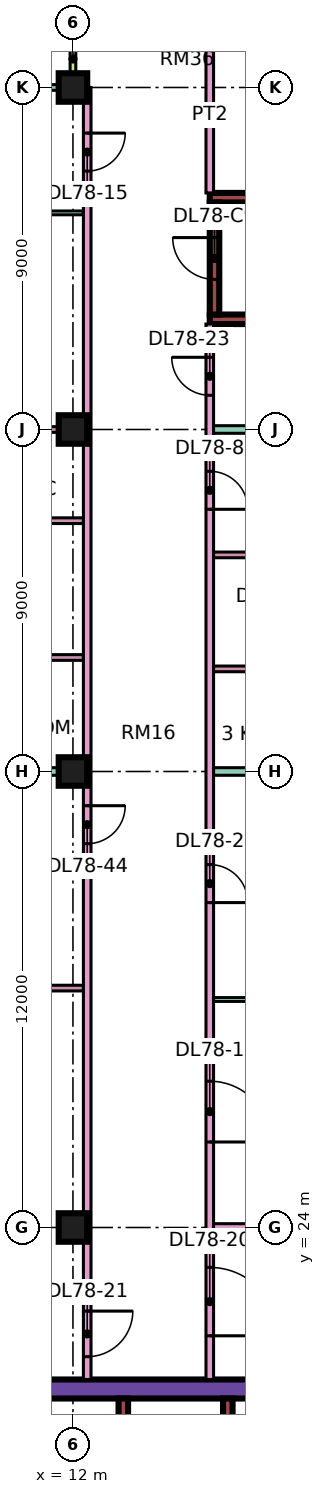
"""IFC4 building model, lengths in metres.
Left out: names, types, materials, properties, quantities, classifications, styles, units other than length and angle.
Written with IfcOpenShell. Run it as: python <this file> out.ifc"""

import sys

from ifc_helpers import new_model, si_unit, direction, frame, frame_2d, origin, origin_2d, place, context, subcontext, project, spatial, rectangle, extrude, element, fill, save


model = new_model("IFC4")
c1 = context("Model", 3, precision=1e-05, world=origin(), true_north=direction((0.0, 1.0)))
c2 = subcontext(c1, "Body", "Model", "MODEL_VIEW")
j1 = project(units=[si_unit("LENGTHUNIT", "METRE"), si_unit("PLANEANGLEUNIT", "RADIAN")], contexts=[c1])
p1 = place(None, origin())
s1 = spatial("IfcSite", under=j1, at=p1, CompositionType="ELEMENT")
p2 = place(p1, origin())
s2 = spatial("IfcBuilding", under=s1, at=p2, CompositionType="ELEMENT")
p3 = place(p2, frame((0.0, 0.0, 338.9)))
s3 = spatial("IfcBuildingStorey", under=s2, at=p3, CompositionType="ELEMENT", Elevation=338.9)
for number, where, z_axis, x_axis in (
    (1, (12.0, 24.0, 0.0), (0.0, 0.0, 1.0), (1.0, 0.0, 0.0)),
    (2, (12.0, 36.0, 0.0), (0.0, 0.0, 1.0), (1.0, 0.0, 0.0)),
    (3, (12.0, 45.0, 0.0), (0.0, 0.0, 1.0), (1.0, 0.0, 0.0)),
    (4, (12.0, 54.0, 0.0), (0.0, 0.0, 1.0), (1.0, 0.0, 0.0)),
):
    element("IfcColumn", number, at=place(p3, frame(where, z_axis=z_axis, x_axis=x_axis)), inside=s3, PredefinedType="COLUMN", context=c2, shape_type="SweptSolid", body=[
        extrude(rectangle(XDim=0.75, YDim=0.75, at=origin_2d()), origin(), (0.0, 0.0, 1.0), 3.75),
    ])
p4 = place(p3, frame((9.0, 19.75, 0.0), z_axis=(0.0, 0.0, 1.0), x_axis=(1.0, 0.0, 0.0)))
e5 = element("IfcWall", 5, at=p4, inside=s3, PredefinedType="SHEAR", context=c2, shape_type="SweptSolid", body=[
    extrude(rectangle(XDim=25.0, YDim=0.5, at=frame_2d((12.5, 0.0))), origin(), (0.0, 0.0, 1.0), 3.75),
])
p5 = place(p4, frame((19.1, 0.0, 0.0)))
e6 = element("IfcOpeningElement", 6, at=p5, cuts=e5, PredefinedType="OPENING", context=c2, shape_type="SweptSolid", body=[
    extrude(rectangle(XDim=1.8, YDim=2.4, at=frame_2d((0.9, 1.2))), frame((0.0, 0.26, 0.0), z_axis=(0.0, -1.0, 0.0), x_axis=(1.0, 0.0, 0.0)), (0.0, 0.0, 1.0), 0.52),
])
p6 = place(p3, frame((13.325, 7.5, 0.0), z_axis=(0.0, 0.0, 1.0), x_axis=(0.0, 1.0, 0.0)))
e7 = element("IfcWall", 7, at=p6, inside=s3, PredefinedType="SHEAR", context=c2, shape_type="SweptSolid", body=[
    extrude(rectangle(XDim=12.0, YDim=0.25, at=frame_2d((6.0, 0.0))), origin(), (0.0, 0.0, 1.0), 3.75),
])
p7 = place(p3, frame((16.075, 15.8, 0.0), z_axis=(0.0, 0.0, 1.0), x_axis=(0.0, 1.0, 0.0)))
e8 = element("IfcWall", 8, at=p7, inside=s3, PredefinedType="SHEAR", context=c2, shape_type="SweptSolid", body=[
    extrude(rectangle(XDim=3.7, YDim=0.25, at=frame_2d((1.85, 0.0))), origin(), (0.0, 0.0, 1.0), 3.75),
])
for number, where, z_axis, x_axis in (
    (9, (15.6, 47.9, 0.0), (0.0, 0.0, 1.0), (1.0, 0.0, 0.0)),
    (10, (15.6, 51.1, 0.0), (0.0, 0.0, 1.0), (1.0, 0.0, 0.0)),
):
    element("IfcWall", number, at=place(p3, frame(where, z_axis=z_axis, x_axis=x_axis)), inside=s3, PredefinedType="SHEAR", context=c2, shape_type="SweptSolid", body=[
        extrude(rectangle(XDim=7.0, YDim=0.25, at=frame_2d((3.5, 0.0))), origin(), (0.0, 0.0, 1.0), 3.75),
    ])
p8 = place(p3, frame((15.725, 48.025, 0.0), z_axis=(0.0, 0.0, 1.0), x_axis=(0.0, 1.0, 0.0)))
e11 = element("IfcWall", 11, at=p8, inside=s3, PredefinedType="SHEAR", context=c2, shape_type="SweptSolid", body=[
    extrude(rectangle(XDim=2.95, YDim=0.25, at=frame_2d((1.475, 0.0))), origin(), (0.0, 0.0, 1.0), 3.75),
])
p9 = place(p8, frame((0.925, 0.0, 0.0)))
e12 = element("IfcOpeningElement", 12, at=p9, cuts=e11, PredefinedType="OPENING", context=c2, shape_type="SweptSolid", body=[
    extrude(rectangle(XDim=1.1, YDim=2.2, at=frame_2d((0.55, 1.1))), frame((0.0, 0.135, 0.0), z_axis=(0.0, -1.0, 0.0), x_axis=(1.0, 0.0, 0.0)), (0.0, 0.0, 1.0), 0.27),
])
p10 = place(p3, frame((11.925, 54.0, 0.0), z_axis=(0.0, 0.0, 1.0), x_axis=(-1.0, 0.0, 0.0)))
e13 = element("IfcWall", 13, at=p10, inside=s3, PredefinedType="SOLIDWALL", context=c2, shape_type="SweptSolid", body=[
    extrude(rectangle(XDim=10.35, YDim=0.15, at=frame_2d((5.175, 0.0))), origin(), (0.0, 0.0, 1.0), 3.35),
])
p11 = place(p10, frame((2.075, 0.0, 0.0)))
e14 = element("IfcOpeningElement", 14, at=p11, cuts=e13, PredefinedType="OPENING", context=c2, shape_type="SweptSolid", body=[
    extrude(rectangle(XDim=1.8, YDim=2.4, at=frame_2d((0.9, 1.2))), frame((0.0, 0.085, 0.0), z_axis=(0.0, -1.0, 0.0), x_axis=(1.0, 0.0, 0.0)), (0.0, 0.0, 1.0), 0.17),
])
p12 = place(p10, frame((6.45, 0.0, 0.45)))
e15 = element("IfcOpeningElement", 15, at=p12, cuts=e13, PredefinedType="OPENING", context=c2, shape_type="SweptSolid", body=[
    extrude(rectangle(XDim=3.0, YDim=2.4, at=frame_2d((1.5, 1.2))), frame((0.0, 0.085, 0.0), z_axis=(0.0, -1.0, 0.0), x_axis=(1.0, 0.0, 0.0)), (0.0, 0.0, 1.0), 0.17),
])
p13 = place(p3, frame((12.0, 55.5, 0.0), z_axis=(0.0, 0.0, 1.0), x_axis=(0.0, -1.0, 0.0)))
e16 = element("IfcWall", 16, at=p13, inside=s3, PredefinedType="SOLIDWALL", context=c2, shape_type="SweptSolid", body=[
    extrude(rectangle(XDim=1.5, YDim=0.15, at=frame_2d((0.75, 0.0))), origin(), (0.0, 0.0, 1.0), 3.35),
])
p14 = place(p3, frame((-1.35, 22.4, 0.0), z_axis=(0.0, 0.0, 1.0), x_axis=(1.0, 0.0, 0.0)))
e17 = element("IfcWall", 17, at=p14, inside=s3, PredefinedType="PARTITIONING", context=c2, shape_type="SweptSolid", body=[
    extrude(rectangle(XDim=13.625, YDim=0.2, at=frame_2d((6.812, 0.0))), origin(), (0.0, 0.0, 1.0), 3.35),
])
p15 = place(p3, frame((0.0, 36.0, 0.0), z_axis=(0.0, 0.0, 1.0), x_axis=(1.0, 0.0, 0.0)))
e18 = element("IfcWall", 18, at=p15, inside=s3, PredefinedType="PARTITIONING", context=c2, shape_type="SweptSolid", body=[
    extrude(rectangle(XDim=12.275, YDim=0.2, at=frame_2d((6.137, 0.0))), origin(), (0.0, 0.0, 1.0), 3.35),
])
for number, where, z_axis, x_axis in (
    (19, (7.65, 30.3, 0.0), (0.0, 0.0, 1.0), (1.0, 0.0, 0.0)),
    (20, (7.65, 33.3, 0.0), (0.0, 0.0, 1.0), (1.0, 0.0, 0.0)),
    (21, (7.65, 39.0, 0.0), (0.0, 0.0, 1.0), (1.0, 0.0, 0.0)),
    (22, (7.65, 42.6, 0.0), (0.0, 0.0, 1.0), (1.0, 0.0, 0.0)),
    (23, (7.65, 45.0, 0.0), (0.0, 0.0, 1.0), (1.0, 0.0, 0.0)),
):
    element("IfcWall", number, at=place(p3, frame(where, z_axis=z_axis, x_axis=x_axis)), inside=s3, PredefinedType="PARTITIONING", context=c2, shape_type="SweptSolid", body=[
        extrude(rectangle(XDim=4.625, YDim=0.15, at=frame_2d((2.312, 0.0))), origin(), (0.0, 0.0, 1.0), 3.35),
    ])
p16 = place(p3, frame((7.65, 50.7, 0.0), z_axis=(0.0, 0.0, 1.0), x_axis=(1.0, 0.0, 0.0)))
e24 = element("IfcWall", 24, at=p16, inside=s3, PredefinedType="PARTITIONING", context=c2, shape_type="SweptSolid", body=[
    extrude(rectangle(XDim=4.625, YDim=0.1, at=frame_2d((2.312, 0.0))), origin(), (0.0, 0.0, 1.0), 3.35),
])
p17 = place(p16, frame((1.875, 0.0, 0.0)))
e25 = element("IfcOpeningElement", 25, at=p17, cuts=e24, PredefinedType="OPENING", context=c2, shape_type="SweptSolid", body=[
    extrude(rectangle(XDim=0.9, YDim=2.1, at=frame_2d((0.45, 1.05))), frame((0.0, 0.06, 0.0), z_axis=(0.0, -1.0, 0.0), x_axis=(1.0, 0.0, 0.0)), (0.0, 0.0, 1.0), 0.12),
])
p18 = place(p3, frame((12.375, 20.0, 0.0), z_axis=(0.0, 0.0, 1.0), x_axis=(0.0, 1.0, 0.0)))
e26 = element("IfcWall", 26, at=p18, inside=s3, PredefinedType="PARTITIONING", context=c2, shape_type="SweptSolid", body=[
    extrude(rectangle(XDim=34.0, YDim=0.2, at=frame_2d((17.0, 0.0))), origin(), (0.0, 0.0, 1.0), 3.35),
])
p19 = place(p18, frame((31.8, 0.0, 0.0)))
e27 = element("IfcOpeningElement", 27, at=p19, cuts=e26, PredefinedType="OPENING", context=c2, shape_type="SweptSolid", body=[
    extrude(rectangle(XDim=1.0, YDim=2.1, at=frame_2d((0.5, 1.05))), frame((0.0, 0.11, 0.0), z_axis=(0.0, -1.0, 0.0), x_axis=(1.0, 0.0, 0.0)), (0.0, 0.0, 1.0), 0.22),
])
p20 = place(p18, frame((0.6, 0.0, 0.0)))
e28 = element("IfcOpeningElement", 28, at=p20, cuts=e26, PredefinedType="OPENING", context=c2, shape_type="SweptSolid", body=[
    extrude(rectangle(XDim=1.2, YDim=2.1, at=frame_2d((0.6, 1.05))), frame((0.0, 0.11, 0.0), z_axis=(0.0, -1.0, 0.0), x_axis=(1.0, 0.0, 0.0)), (0.0, 0.0, 1.0), 0.22),
])
p21 = place(p18, frame((14.1, 0.0, 0.0)))
e29 = element("IfcOpeningElement", 29, at=p21, cuts=e26, PredefinedType="OPENING", context=c2, shape_type="SweptSolid", body=[
    extrude(rectangle(XDim=1.0, YDim=2.1, at=frame_2d((0.5, 1.05))), frame((0.0, 0.11, 0.0), z_axis=(0.0, -1.0, 0.0), x_axis=(1.0, 0.0, 0.0)), (0.0, 0.0, 1.0), 0.22),
])
p22 = place(p3, frame((15.6, 20.0, 0.0), z_axis=(0.0, 0.0, 1.0), x_axis=(0.0, 1.0, 0.0)))
e30 = element("IfcWall", 30, at=p22, inside=s3, PredefinedType="PARTITIONING", context=c2, shape_type="SweptSolid", body=[
    extrude(rectangle(XDim=27.775, YDim=0.2, at=frame_2d((13.887, 0.0))), origin(), (0.0, 0.0, 1.0), 3.35),
])
p23 = place(p22, frame((6.25, 0.0, 0.0)))
e31 = element("IfcOpeningElement", 31, at=p23, cuts=e30, PredefinedType="OPENING", context=c2, shape_type="SweptSolid", body=[
    extrude(rectangle(XDim=1.6, YDim=2.1, at=frame_2d((0.8, 1.05))), frame((0.0, 0.11, 0.0), z_axis=(0.0, -1.0, 0.0), x_axis=(1.0, 0.0, 0.0)), (0.0, 0.0, 1.0), 0.22),
])
p24 = place(p22, frame((12.55, 0.0, 0.0)))
e32 = element("IfcOpeningElement", 32, at=p24, cuts=e30, PredefinedType="OPENING", context=c2, shape_type="SweptSolid", body=[
    extrude(rectangle(XDim=1.0, YDim=2.1, at=frame_2d((0.5, 1.05))), frame((0.0, 0.11, 0.0), z_axis=(0.0, -1.0, 0.0), x_axis=(1.0, 0.0, 0.0)), (0.0, 0.0, 1.0), 0.22),
])
p25 = place(p22, frame((22.9, 0.0, 0.0)))
e33 = element("IfcOpeningElement", 33, at=p25, cuts=e30, PredefinedType="OPENING", context=c2, shape_type="SweptSolid", body=[
    extrude(rectangle(XDim=1.0, YDim=2.1, at=frame_2d((0.5, 1.05))), frame((0.0, 0.11, 0.0), z_axis=(0.0, -1.0, 0.0), x_axis=(1.0, 0.0, 0.0)), (0.0, 0.0, 1.0), 0.22),
])
p26 = place(p22, frame((1.15, 0.0, 0.0)))
e34 = element("IfcOpeningElement", 34, at=p26, cuts=e30, PredefinedType="OPENING", context=c2, shape_type="SweptSolid", body=[
    extrude(rectangle(XDim=1.8, YDim=2.1, at=frame_2d((0.9, 1.05))), frame((0.0, 0.11, 0.0), z_axis=(0.0, -1.0, 0.0), x_axis=(1.0, 0.0, 0.0)), (0.0, 0.0, 1.0), 0.22),
])
p27 = place(p22, frame((25.9, 0.0, 0.0)))
e35 = element("IfcOpeningElement", 35, at=p27, cuts=e30, PredefinedType="OPENING", context=c2, shape_type="SweptSolid", body=[
    extrude(rectangle(XDim=1.0, YDim=2.1, at=frame_2d((0.5, 1.05))), frame((0.0, 0.11, 0.0), z_axis=(0.0, -1.0, 0.0), x_axis=(1.0, 0.0, 0.0)), (0.0, 0.0, 1.0), 0.22),
])
p28 = place(p3, frame((15.6, 51.225, 0.0), z_axis=(0.0, 0.0, 1.0), x_axis=(0.0, 1.0, 0.0)))
e36 = element("IfcWall", 36, at=p28, inside=s3, PredefinedType="PARTITIONING", context=c2, shape_type="SweptSolid", body=[
    extrude(rectangle(XDim=4.125, YDim=0.2, at=frame_2d((2.062, 0.0))), origin(), (0.0, 0.0, 1.0), 3.35),
])
p29 = place(p3, frame((15.7, 24.0, 0.0), z_axis=(0.0, 0.0, 1.0), x_axis=(1.0, 0.0, 0.0)))
e37 = element("IfcWall", 37, at=p29, inside=s3, PredefinedType="PARTITIONING", context=c2, shape_type="SweptSolid", body=[
    extrude(rectangle(XDim=5.8, YDim=0.2, at=frame_2d((2.9, 0.0))), origin(), (0.0, 0.0, 1.0), 3.35),
])
p30 = place(p3, frame((15.7, 30.0, 0.0), z_axis=(0.0, 0.0, 1.0), x_axis=(1.0, 0.0, 0.0)))
e38 = element("IfcWall", 38, at=p30, inside=s3, PredefinedType="PARTITIONING", context=c2, shape_type="SweptSolid", body=[
    extrude(rectangle(XDim=5.8, YDim=0.1, at=frame_2d((2.9, 0.0))), origin(), (0.0, 0.0, 1.0), 3.35),
])
p31 = place(p3, frame((15.7, 36.0, 0.0), z_axis=(0.0, 0.0, 1.0), x_axis=(1.0, 0.0, 0.0)))
e39 = element("IfcWall", 39, at=p31, inside=s3, PredefinedType="PARTITIONING", context=c2, shape_type="SweptSolid", body=[
    extrude(rectangle(XDim=8.3, YDim=0.2, at=frame_2d((4.15, 0.0))), origin(), (0.0, 0.0, 1.0), 3.35),
])
p32 = place(p3, frame((15.7, 38.7, 0.0), z_axis=(0.0, 0.0, 1.0), x_axis=(1.0, 0.0, 0.0)))
e40 = element("IfcWall", 40, at=p32, inside=s3, PredefinedType="PARTITIONING", context=c2, shape_type="SweptSolid", body=[
    extrude(rectangle(XDim=3.125, YDim=0.15, at=frame_2d((1.562, 0.0))), origin(), (0.0, 0.0, 1.0), 3.35),
])
p33 = place(p3, frame((15.7, 41.7, 0.0), z_axis=(0.0, 0.0, 1.0), x_axis=(1.0, 0.0, 0.0)))
e41 = element("IfcWall", 41, at=p33, inside=s3, PredefinedType="PARTITIONING", context=c2, shape_type="SweptSolid", body=[
    extrude(rectangle(XDim=3.125, YDim=0.15, at=frame_2d((1.562, 0.0))), origin(), (0.0, 0.0, 1.0), 3.35),
])
p34 = place(p33, frame((1.1, 0.0, 0.0)))
e42 = element("IfcOpeningElement", 42, at=p34, cuts=e41, PredefinedType="OPENING", context=c2, shape_type="SweptSolid", body=[
    extrude(rectangle(XDim=0.8, YDim=2.1, at=frame_2d((0.4, 1.05))), frame((0.0, 0.085, 0.0), z_axis=(0.0, -1.0, 0.0), x_axis=(1.0, 0.0, 0.0)), (0.0, 0.0, 1.0), 0.17),
])
p35 = place(p3, frame((15.7, 45.0, 0.0), z_axis=(0.0, 0.0, 1.0), x_axis=(1.0, 0.0, 0.0)))
e43 = element("IfcWall", 43, at=p35, inside=s3, PredefinedType="PARTITIONING", context=c2, shape_type="SweptSolid", body=[
    extrude(rectangle(XDim=8.3, YDim=0.2, at=frame_2d((4.15, 0.0))), origin(), (0.0, 0.0, 1.0), 3.35),
])
p36 = place(p9, frame((1.1, 0.0, 0.0), z_axis=(0.0, 0.0, 1.0), x_axis=(-1.0, 0.0, 0.0)))
e44 = element("IfcDoor", 44, at=p36, inside=s3, OperationType="SINGLE_SWING_RIGHT", PredefinedType="DOOR", context=c2, shape_type="SweptSolid", body=[
    extrude(rectangle(XDim=1.1, YDim=2.2, at=frame_2d((0.55, 1.1))), frame((0.0, 0.025, 0.0), z_axis=(0.0, -1.0, 0.0), x_axis=(1.0, 0.0, 0.0)), (0.0, 0.0, 1.0), 0.05),
])
fill(e12, e44)
p37 = place(p23, frame((1.6, 0.0, 0.0), z_axis=(0.0, 0.0, 1.0), x_axis=(-1.0, 0.0, 0.0)))
e45 = element("IfcDoor", 45, at=p37, inside=s3, OperationType="DOUBLE_DOOR_SINGLE_SWING", PredefinedType="DOOR", context=c2, shape_type="SweptSolid", body=[
    extrude(rectangle(XDim=1.6, YDim=2.1, at=frame_2d((0.8, 1.05))), frame((0.0, 0.025, 0.0), z_axis=(0.0, -1.0, 0.0), x_axis=(1.0, 0.0, 0.0)), (0.0, 0.0, 1.0), 0.05),
])
fill(e31, e45)
p38 = place(p24, frame((1.0, 0.0, 0.0), z_axis=(0.0, 0.0, 1.0), x_axis=(-1.0, 0.0, 0.0)))
e46 = element("IfcDoor", 46, at=p38, inside=s3, OperationType="SINGLE_SWING_LEFT", PredefinedType="DOOR", context=c2, shape_type="SweptSolid", body=[
    extrude(rectangle(XDim=1.0, YDim=2.1, at=frame_2d((0.5, 1.05))), frame((0.0, 0.025, 0.0), z_axis=(0.0, -1.0, 0.0), x_axis=(1.0, 0.0, 0.0)), (0.0, 0.0, 1.0), 0.05),
])
fill(e32, e46)
p39 = place(p25, frame((1.0, 0.0, 0.0), z_axis=(0.0, 0.0, 1.0), x_axis=(-1.0, 0.0, 0.0)))
e47 = element("IfcDoor", 47, at=p39, inside=s3, OperationType="SINGLE_SWING_LEFT", PredefinedType="DOOR", context=c2, shape_type="SweptSolid", body=[
    extrude(rectangle(XDim=1.0, YDim=2.1, at=frame_2d((0.5, 1.05))), frame((0.0, 0.025, 0.0), z_axis=(0.0, -1.0, 0.0), x_axis=(1.0, 0.0, 0.0)), (0.0, 0.0, 1.0), 0.05),
])
fill(e33, e47)
p40 = place(p19, origin())
e48 = element("IfcDoor", 48, at=p40, inside=s3, OperationType="SINGLE_SWING_RIGHT", PredefinedType="DOOR", context=c2, shape_type="SweptSolid", body=[
    extrude(rectangle(XDim=1.0, YDim=2.1, at=frame_2d((0.5, 1.05))), frame((0.0, 0.025, 0.0), z_axis=(0.0, -1.0, 0.0), x_axis=(1.0, 0.0, 0.0)), (0.0, 0.0, 1.0), 0.05),
])
fill(e27, e48)
p41 = place(p26, frame((1.8, 0.0, 0.0), z_axis=(0.0, 0.0, 1.0), x_axis=(-1.0, 0.0, 0.0)))
e49 = element("IfcDoor", 49, at=p41, inside=s3, OperationType="DOUBLE_DOOR_SINGLE_SWING", PredefinedType="DOOR", context=c2, shape_type="SweptSolid", body=[
    extrude(rectangle(XDim=1.8, YDim=2.1, at=frame_2d((0.9, 1.05))), frame((0.0, 0.025, 0.0), z_axis=(0.0, -1.0, 0.0), x_axis=(1.0, 0.0, 0.0)), (0.0, 0.0, 1.0), 0.05),
])
fill(e34, e49)
p42 = place(p20, origin())
e50 = element("IfcDoor", 50, at=p42, inside=s3, OperationType="SINGLE_SWING_RIGHT", PredefinedType="DOOR", context=c2, shape_type="SweptSolid", body=[
    extrude(rectangle(XDim=1.2, YDim=2.1, at=frame_2d((0.6, 1.05))), frame((0.0, 0.025, 0.0), z_axis=(0.0, -1.0, 0.0), x_axis=(1.0, 0.0, 0.0)), (0.0, 0.0, 1.0), 0.05),
])
fill(e28, e50)
p43 = place(p27, frame((1.0, 0.0, 0.0), z_axis=(0.0, 0.0, 1.0), x_axis=(-1.0, 0.0, 0.0)))
e51 = element("IfcDoor", 51, at=p43, inside=s3, OperationType="SINGLE_SWING_RIGHT", PredefinedType="DOOR", context=c2, shape_type="SweptSolid", body=[
    extrude(rectangle(XDim=1.0, YDim=2.1, at=frame_2d((0.5, 1.05))), frame((0.0, 0.025, 0.0), z_axis=(0.0, -1.0, 0.0), x_axis=(1.0, 0.0, 0.0)), (0.0, 0.0, 1.0), 0.05),
])
fill(e35, e51)
p44 = place(p21, origin())
e52 = element("IfcDoor", 52, at=p44, inside=s3, OperationType="SINGLE_SWING_RIGHT", PredefinedType="DOOR", context=c2, shape_type="SweptSolid", body=[
    extrude(rectangle(XDim=1.0, YDim=2.1, at=frame_2d((0.5, 1.05))), frame((0.0, 0.025, 0.0), z_axis=(0.0, -1.0, 0.0), x_axis=(1.0, 0.0, 0.0)), (0.0, 0.0, 1.0), 0.05),
])
fill(e29, e52)
save(model, sys.argv[1])
